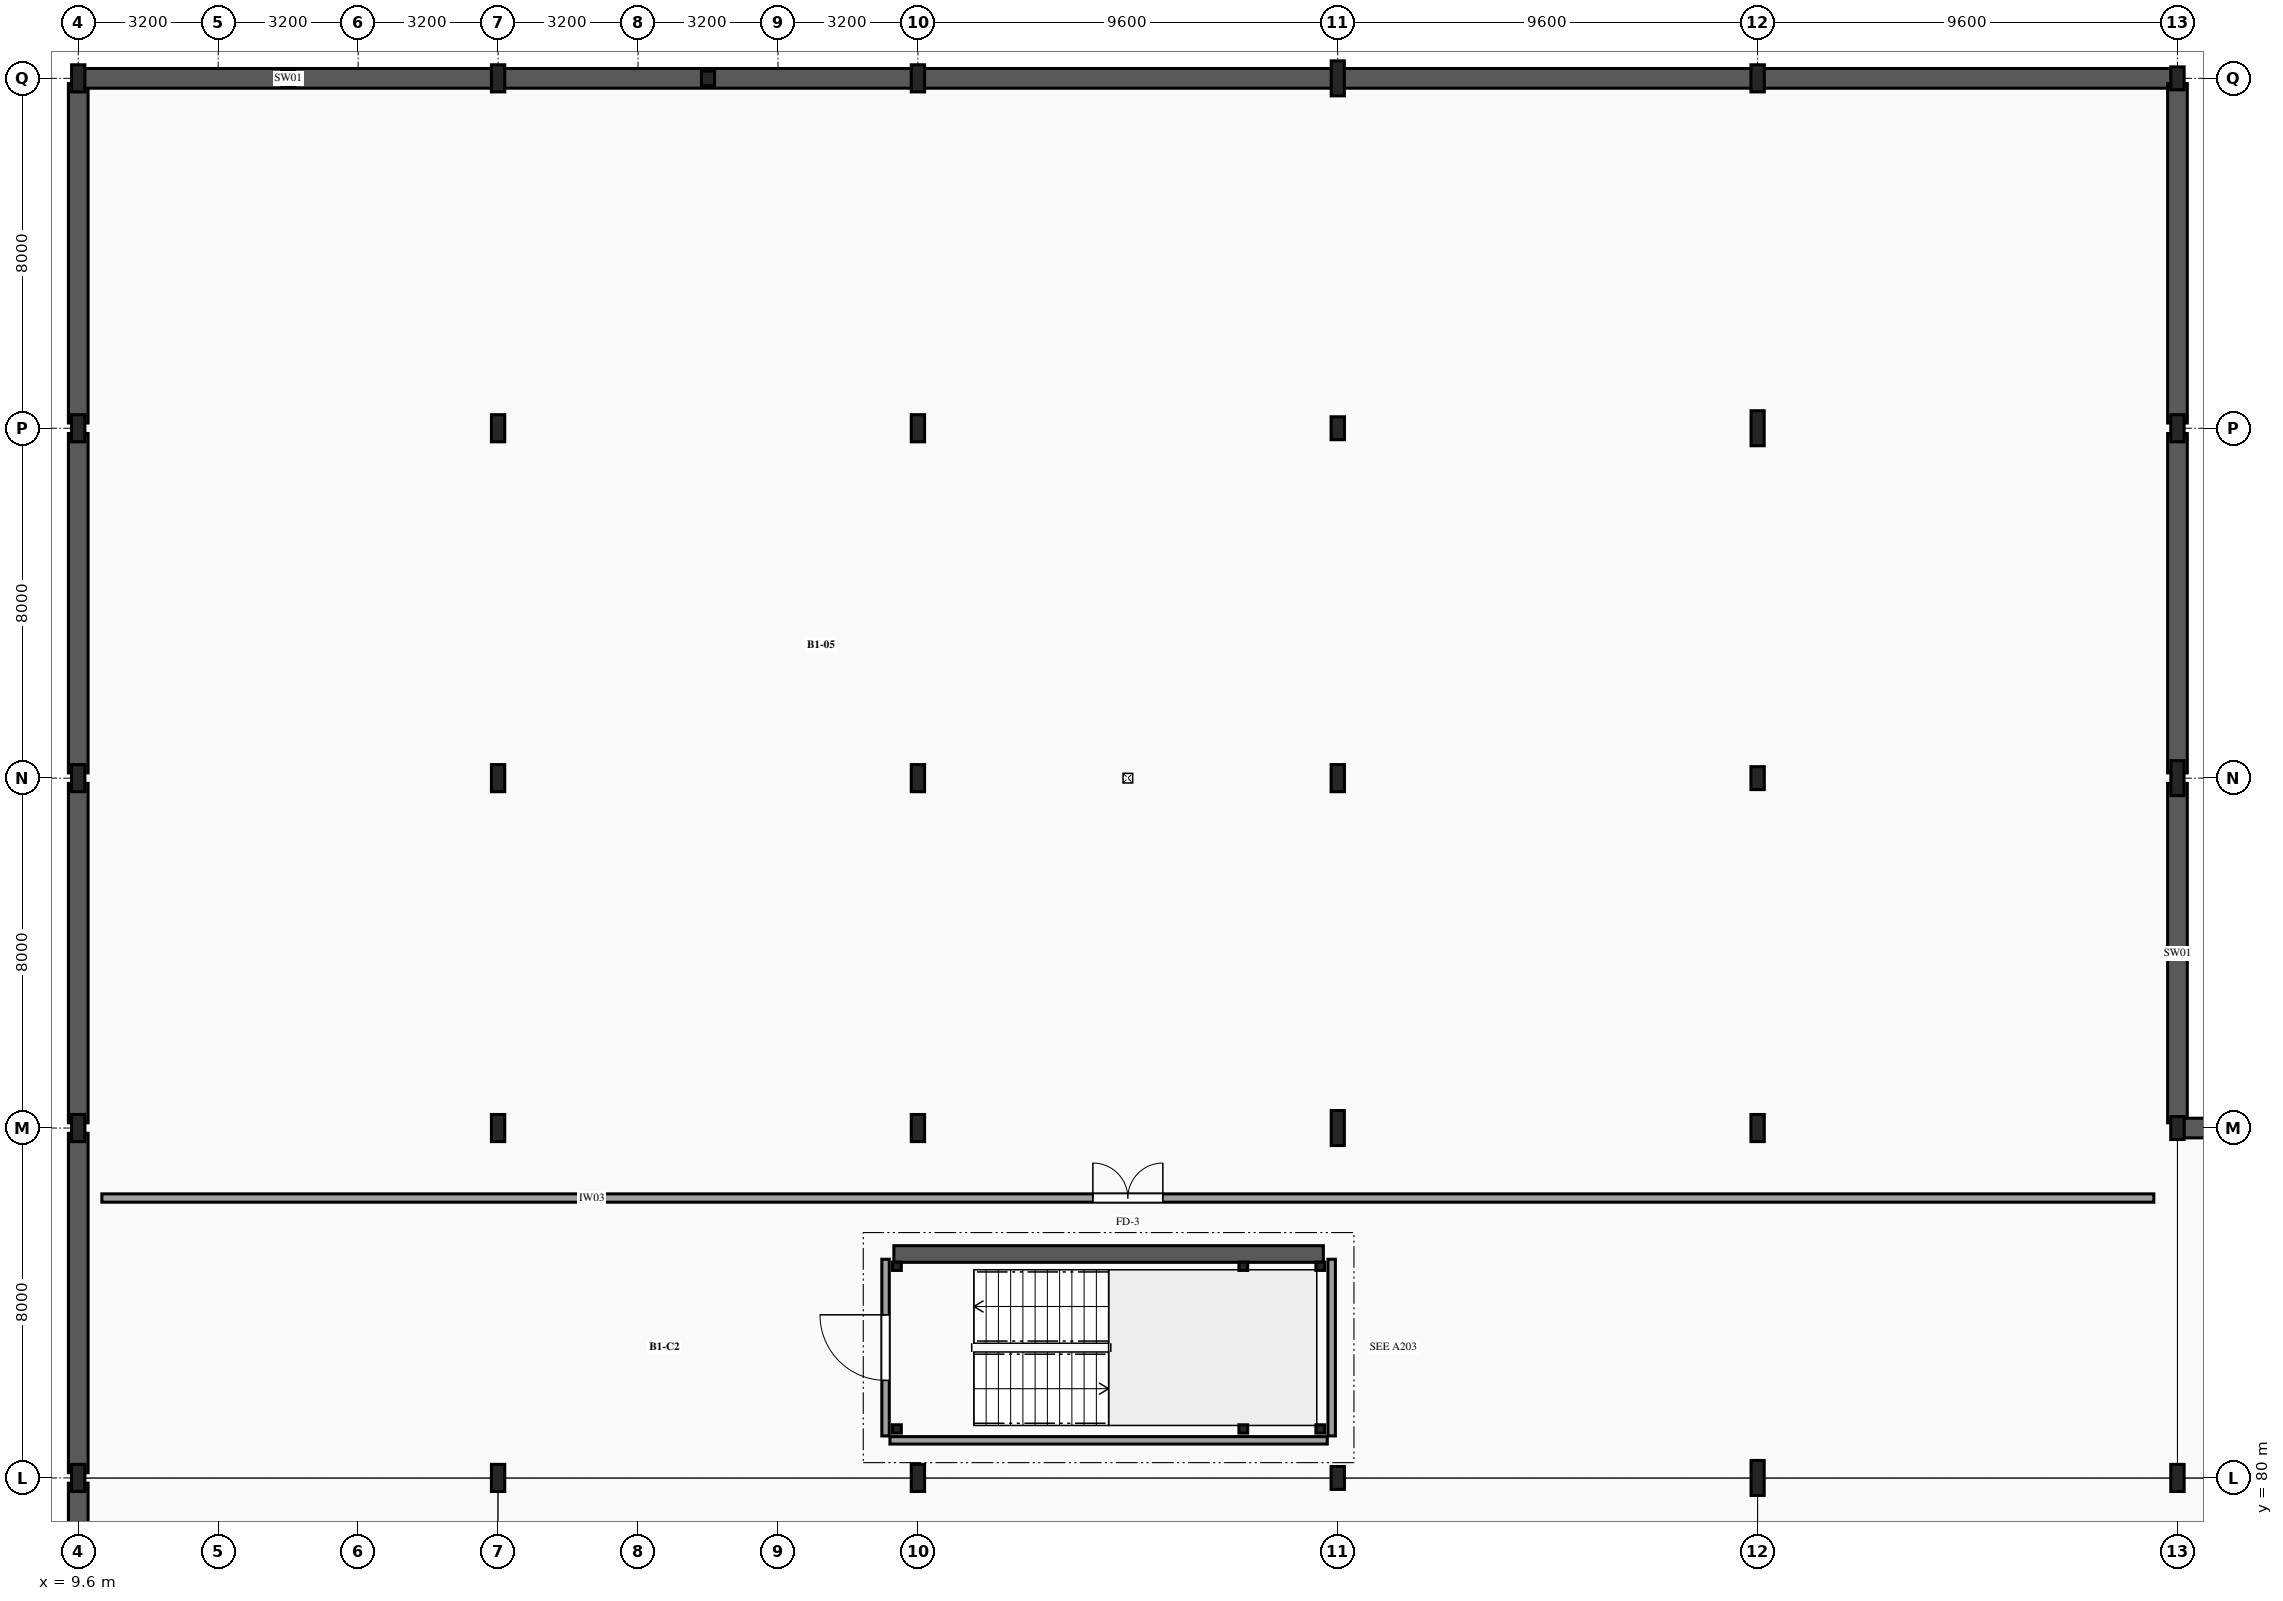
"""IFC4 building model, lengths in metres.
Left out: names, types, materials, properties, quantities, classifications, styles, units other than length and angle.
Written with IfcOpenShell. Run it as: python <this file> out.ifc"""

import sys

from ifc_helpers import new_model, si_unit, direction, frame, frame_2d, origin, origin_2d, place, context, subcontext, project, spatial, rectangle, i_section, extrude, element, fill, save


model = new_model("IFC4")
c1 = context("Model", 3, precision=1e-05, world=origin(), true_north=direction((0.0, 1.0)))
c2 = subcontext(c1, "Body", "Model", "MODEL_VIEW")
j1 = project(units=[si_unit("LENGTHUNIT", "METRE"), si_unit("PLANEANGLEUNIT", "RADIAN")], contexts=[c1])
p1 = place(None, origin())
s1 = spatial("IfcSite", under=j1, at=p1, CompositionType="ELEMENT")
p2 = place(p1, origin())
s2 = spatial("IfcBuilding", under=s1, at=p2, CompositionType="ELEMENT")
p3 = place(p2, frame((0.0, 0.0, -4.5)))
s3 = spatial("IfcBuildingStorey", under=s2, at=p3, CompositionType="ELEMENT", Elevation=-4.5)
for number, where, z_axis, x_axis in (
    (1, (9.6, 80.0, 0.0), (0.0, 0.0, 1.0), (1.0, 0.0, 0.0)),
    (2, (9.6, 88.0, 0.0), (0.0, 0.0, 1.0), (1.0, 0.0, 0.0)),
    (3, (9.6, 96.0, 0.0), (0.0, 0.0, 1.0), (1.0, 0.0, 0.0)),
    (4, (9.6, 104.0, 0.0), (0.0, 0.0, 1.0), (1.0, 0.0, 0.0)),
    (5, (9.6, 112.0, 0.0), (0.0, 0.0, 1.0), (1.0, 0.0, 0.0)),
    (6, (19.2, 80.0, 0.0), (0.0, 0.0, 1.0), (1.0, 0.0, 0.0)),
    (7, (19.2, 88.0, 0.0), (0.0, 0.0, 1.0), (1.0, 0.0, 0.0)),
    (8, (19.2, 96.0, 0.0), (0.0, 0.0, 1.0), (1.0, 0.0, 0.0)),
    (9, (19.2, 104.0, 0.0), (0.0, 0.0, 1.0), (1.0, 0.0, 0.0)),
    (10, (19.2, 112.0, 0.0), (0.0, 0.0, 1.0), (1.0, 0.0, 0.0)),
    (11, (28.8, 80.0, 0.0), (0.0, 0.0, 1.0), (1.0, 0.0, 0.0)),
    (12, (28.8, 88.0, 0.0), (0.0, 0.0, 1.0), (1.0, 0.0, 0.0)),
    (13, (28.8, 96.0, 0.0), (0.0, 0.0, 1.0), (1.0, 0.0, 0.0)),
    (14, (28.8, 104.0, 0.0), (0.0, 0.0, 1.0), (1.0, 0.0, 0.0)),
    (15, (28.8, 112.0, 0.0), (0.0, 0.0, 1.0), (1.0, 0.0, 0.0)),
):
    element("IfcColumn", number, at=place(p3, frame(where, z_axis=z_axis, x_axis=x_axis)), inside=s3, PredefinedType="COLUMN", context=c2, shape_type="SweptSolid", body=[
        extrude(i_section(OverallWidth=0.305, OverallDepth=0.62, WebThickness=0.021, FlangeThickness=0.04, FilletRadius=0.027, at=origin_2d()), origin(), (0.0, 0.0, 1.0), 4.22),
    ])
p4 = place(p3, frame((38.4, 80.0, 0.0), z_axis=(0.0, 0.0, 1.0), x_axis=(1.0, 0.0, 0.0)))
e16 = element("IfcColumn", 16, at=p4, inside=s3, PredefinedType="COLUMN", context=c2, shape_type="SweptSolid", body=[
    extrude(i_section(OverallWidth=0.306, OverallDepth=0.524, WebThickness=0.021, FlangeThickness=0.04, FilletRadius=0.027, at=origin_2d()), origin(), (0.0, 0.0, 1.0), 4.22),
])
p5 = place(p3, frame((38.4, 88.0, 0.0), z_axis=(0.0, 0.0, 1.0), x_axis=(1.0, 0.0, 0.0)))
e17 = element("IfcColumn", 17, at=p5, inside=s3, PredefinedType="COLUMN", context=c2, shape_type="SweptSolid", body=[
    extrude(i_section(OverallWidth=0.3, OverallDepth=0.8, WebThickness=0.018, FlangeThickness=0.033, FilletRadius=0.03, at=origin_2d()), origin(), (0.0, 0.0, 1.0), 4.22),
])
p6 = place(p3, frame((38.4, 96.0, 0.0), z_axis=(0.0, 0.0, 1.0), x_axis=(1.0, 0.0, 0.0)))
e18 = element("IfcColumn", 18, at=p6, inside=s3, PredefinedType="COLUMN", context=c2, shape_type="SweptSolid", body=[
    extrude(i_section(OverallWidth=0.305, OverallDepth=0.62, WebThickness=0.021, FlangeThickness=0.04, FilletRadius=0.027, at=origin_2d()), origin(), (0.0, 0.0, 1.0), 4.22),
])
p7 = place(p3, frame((38.4, 104.0, 0.0), z_axis=(0.0, 0.0, 1.0), x_axis=(1.0, 0.0, 0.0)))
e19 = element("IfcColumn", 19, at=p7, inside=s3, PredefinedType="COLUMN", context=c2, shape_type="SweptSolid", body=[
    extrude(i_section(OverallWidth=0.306, OverallDepth=0.524, WebThickness=0.021, FlangeThickness=0.04, FilletRadius=0.027, at=origin_2d()), origin(), (0.0, 0.0, 1.0), 4.22),
])
for number, where, z_axis, x_axis in (
    (20, (38.4, 112.0, 0.0), (0.0, 0.0, 1.0), (1.0, 0.0, 0.0)),
    (21, (48.0, 80.0, 0.0), (0.0, 0.0, 1.0), (1.0, 0.0, 0.0)),
):
    element("IfcColumn", number, at=place(p3, frame(where, z_axis=z_axis, x_axis=x_axis)), inside=s3, PredefinedType="COLUMN", context=c2, shape_type="SweptSolid", body=[
        extrude(i_section(OverallWidth=0.3, OverallDepth=0.8, WebThickness=0.018, FlangeThickness=0.033, FilletRadius=0.03, at=origin_2d()), origin(), (0.0, 0.0, 1.0), 4.22),
    ])
p8 = place(p3, frame((48.0, 88.0, 0.0), z_axis=(0.0, 0.0, 1.0), x_axis=(1.0, 0.0, 0.0)))
e22 = element("IfcColumn", 22, at=p8, inside=s3, PredefinedType="COLUMN", context=c2, shape_type="SweptSolid", body=[
    extrude(i_section(OverallWidth=0.305, OverallDepth=0.62, WebThickness=0.021, FlangeThickness=0.04, FilletRadius=0.027, at=origin_2d()), origin(), (0.0, 0.0, 1.0), 4.22),
])
p9 = place(p3, frame((48.0, 96.0, 0.0), z_axis=(0.0, 0.0, 1.0), x_axis=(1.0, 0.0, 0.0)))
e23 = element("IfcColumn", 23, at=p9, inside=s3, PredefinedType="COLUMN", context=c2, shape_type="SweptSolid", body=[
    extrude(i_section(OverallWidth=0.306, OverallDepth=0.524, WebThickness=0.021, FlangeThickness=0.04, FilletRadius=0.027, at=origin_2d()), origin(), (0.0, 0.0, 1.0), 4.22),
])
p10 = place(p3, frame((48.0, 104.0, 0.0), z_axis=(0.0, 0.0, 1.0), x_axis=(1.0, 0.0, 0.0)))
e24 = element("IfcColumn", 24, at=p10, inside=s3, PredefinedType="COLUMN", context=c2, shape_type="SweptSolid", body=[
    extrude(i_section(OverallWidth=0.3, OverallDepth=0.8, WebThickness=0.018, FlangeThickness=0.033, FilletRadius=0.03, at=origin_2d()), origin(), (0.0, 0.0, 1.0), 4.22),
])
for number, where, z_axis, x_axis in (
    (25, (48.0, 112.0, 0.0), (0.0, 0.0, 1.0), (1.0, 0.0, 0.0)),
    (26, (57.6, 80.0, 0.0), (0.0, 0.0, 1.0), (1.0, 0.0, 0.0)),
):
    element("IfcColumn", number, at=place(p3, frame(where, z_axis=z_axis, x_axis=x_axis)), inside=s3, PredefinedType="COLUMN", context=c2, shape_type="SweptSolid", body=[
        extrude(i_section(OverallWidth=0.305, OverallDepth=0.62, WebThickness=0.021, FlangeThickness=0.04, FilletRadius=0.027, at=origin_2d()), origin(), (0.0, 0.0, 1.0), 4.22),
    ])
p11 = place(p3, frame((57.6, 88.0, 0.0), z_axis=(0.0, 0.0, 1.0), x_axis=(1.0, 0.0, 0.0)))
e27 = element("IfcColumn", 27, at=p11, inside=s3, PredefinedType="COLUMN", context=c2, shape_type="SweptSolid", body=[
    extrude(i_section(OverallWidth=0.306, OverallDepth=0.524, WebThickness=0.021, FlangeThickness=0.04, FilletRadius=0.027, at=origin_2d()), origin(), (0.0, 0.0, 1.0), 4.22),
])
p12 = place(p3, frame((57.6, 96.0, 0.0), z_axis=(0.0, 0.0, 1.0), x_axis=(1.0, 0.0, 0.0)))
e28 = element("IfcColumn", 28, at=p12, inside=s3, PredefinedType="COLUMN", context=c2, shape_type="SweptSolid", body=[
    extrude(i_section(OverallWidth=0.3, OverallDepth=0.8, WebThickness=0.018, FlangeThickness=0.033, FilletRadius=0.03, at=origin_2d()), origin(), (0.0, 0.0, 1.0), 4.22),
])
p13 = place(p3, frame((57.6, 104.0, 0.0), z_axis=(0.0, 0.0, 1.0), x_axis=(1.0, 0.0, 0.0)))
e29 = element("IfcColumn", 29, at=p13, inside=s3, PredefinedType="COLUMN", context=c2, shape_type="SweptSolid", body=[
    extrude(i_section(OverallWidth=0.305, OverallDepth=0.62, WebThickness=0.021, FlangeThickness=0.04, FilletRadius=0.027, at=origin_2d()), origin(), (0.0, 0.0, 1.0), 4.22),
])
p14 = place(p3, frame((57.6, 112.0, 0.0), z_axis=(0.0, 0.0, 1.0), x_axis=(1.0, 0.0, 0.0)))
e30 = element("IfcColumn", 30, at=p14, inside=s3, PredefinedType="COLUMN", context=c2, shape_type="SweptSolid", body=[
    extrude(i_section(OverallWidth=0.306, OverallDepth=0.524, WebThickness=0.021, FlangeThickness=0.04, FilletRadius=0.027, at=origin_2d()), origin(), (0.0, 0.0, 1.0), 4.22),
])
for number, where, z_axis, x_axis in (
    (31, (14.4, 112.0, 0.0), (0.0, 0.0, 1.0), (1.0, 0.0, 0.0)),
    (32, (24.0, 112.0, 0.0), (0.0, 0.0, 1.0), (1.0, 0.0, 0.0)),
):
    element("IfcColumn", number, at=place(p3, frame(where, z_axis=z_axis, x_axis=x_axis)), inside=s3, PredefinedType="PILASTER", context=c2, shape_type="SweptSolid", body=[
        extrude(i_section(OverallWidth=0.3, OverallDepth=0.33, WebThickness=0.01, FlangeThickness=0.017, FilletRadius=0.027, at=origin_2d()), origin(), (0.0, 0.0, 1.0), 4.22),
    ])
for number, where, z_axis, x_axis in (
    (33, (9.6, 72.12, 0.0), (0.0, 0.0, 1.0), (0.0, 1.0, 0.0)),
    (34, (9.6, 80.12, 0.0), (0.0, 0.0, 1.0), (0.0, 1.0, 0.0)),
    (35, (9.6, 88.12, 0.0), (0.0, 0.0, 1.0), (0.0, 1.0, 0.0)),
    (36, (9.6, 96.12, 0.0), (0.0, 0.0, 1.0), (0.0, 1.0, 0.0)),
    (37, (9.6, 104.12, 0.0), (0.0, 0.0, 1.0), (0.0, 1.0, 0.0)),
):
    element("IfcWall", number, at=place(p3, frame(where, z_axis=z_axis, x_axis=x_axis)), inside=s3, PredefinedType="SHEAR", context=c2, shape_type="SweptSolid", body=[
        extrude(rectangle(XDim=7.76, YDim=0.45, at=frame_2d((3.88, 0.0))), origin(), (0.0, 0.0, 1.0), 4.22),
    ])
p15 = place(p3, frame((9.72, 112.0, 0.0), z_axis=(0.0, 0.0, 1.0), x_axis=(1.0, 0.0, 0.0)))
e38 = element("IfcWall", 38, at=p15, inside=s3, PredefinedType="SHEAR", context=c2, shape_type="SweptSolid", body=[
    extrude(rectangle(XDim=9.36, YDim=0.45, at=frame_2d((4.68, 0.0))), origin(), (0.0, 0.0, 1.0), 4.22),
])
p16 = place(p3, frame((19.32, 112.0, 0.0), z_axis=(0.0, 0.0, 1.0), x_axis=(1.0, 0.0, 0.0)))
e39 = element("IfcWall", 39, at=p16, inside=s3, PredefinedType="SHEAR", context=c2, shape_type="SweptSolid", body=[
    extrude(rectangle(XDim=9.36, YDim=0.45, at=frame_2d((4.68, 0.0))), origin(), (0.0, 0.0, 1.0), 4.22),
])
p17 = place(p3, frame((28.92, 112.0, 0.0), z_axis=(0.0, 0.0, 1.0), x_axis=(1.0, 0.0, 0.0)))
e40 = element("IfcWall", 40, at=p17, inside=s3, PredefinedType="SHEAR", context=c2, shape_type="SweptSolid", body=[
    extrude(rectangle(XDim=9.36, YDim=0.45, at=frame_2d((4.68, 0.0))), origin(), (0.0, 0.0, 1.0), 4.22),
])
for number, where, z_axis, x_axis in (
    (41, (38.52, 112.0, 0.0), (0.0, 0.0, 1.0), (1.0, 0.0, 0.0)),
    (42, (48.12, 112.0, 0.0), (0.0, 0.0, 1.0), (1.0, 0.0, 0.0)),
):
    element("IfcWall", number, at=place(p3, frame(where, z_axis=z_axis, x_axis=x_axis)), inside=s3, PredefinedType="SHEAR", context=c2, shape_type="SweptSolid", body=[
        extrude(rectangle(XDim=9.36, YDim=0.45, at=frame_2d((4.68, 0.0))), origin(), (0.0, 0.0, 1.0), 4.22),
    ])
for number, where, z_axis, x_axis in (
    (43, (57.6, 88.12, 0.0), (0.0, 0.0, 1.0), (0.0, 1.0, 0.0)),
    (44, (57.6, 96.12, 0.0), (0.0, 0.0, 1.0), (0.0, 1.0, 0.0)),
    (45, (57.6, 104.12, 0.0), (0.0, 0.0, 1.0), (0.0, 1.0, 0.0)),
):
    element("IfcWall", number, at=place(p3, frame(where, z_axis=z_axis, x_axis=x_axis)), inside=s3, PredefinedType="SHEAR", context=c2, shape_type="SweptSolid", body=[
        extrude(rectangle(XDim=7.76, YDim=0.45, at=frame_2d((3.88, 0.0))), origin(), (0.0, 0.0, 1.0), 4.22),
    ])
p18 = place(p3, frame((57.72, 88.0, 0.0), z_axis=(0.0, 0.0, 1.0), x_axis=(1.0, 0.0, 0.0)))
e46 = element("IfcWall", 46, at=p18, inside=s3, PredefinedType="SHEAR", context=c2, shape_type="SweptSolid", body=[
    extrude(rectangle(XDim=9.36, YDim=0.45, at=frame_2d((4.68, 0.0))), origin(), (0.0, 0.0, 1.0), 4.22),
])
p19 = place(p3, frame((28.25, 85.12, 0.0), z_axis=(0.0, 0.0, 1.0), x_axis=(1.0, 0.0, 0.0)))
e47 = element("IfcWall", 47, at=p19, inside=s3, PredefinedType="SHEAR", context=c2, shape_type="SweptSolid", body=[
    extrude(rectangle(XDim=9.82, YDim=0.38, at=frame_2d((4.91, 0.0))), origin(), (0.0, 0.0, 1.0), 4.22),
])
for number, where, z_axis, x_axis in (
    (48, (28.32, 81.12, 0.0), (0.0, 0.0, 1.0), (1.0, 0.0, 0.0)),
    (49, (38.0, 81.12, 0.0), (0.0, 0.0, 1.0), (1.0, 0.0, 0.0)),
    (50, (38.0, 84.84, 0.0), (0.0, 0.0, 1.0), (1.0, 0.0, 0.0)),
    (51, (28.32, 84.84, 0.0), (0.0, 0.0, 1.0), (1.0, 0.0, 0.0)),
    (52, (36.24, 81.12, 0.0), (0.0, 0.0, 1.0), (1.0, 0.0, 0.0)),
    (53, (36.24, 84.84, 0.0), (0.0, 0.0, 1.0), (1.0, 0.0, 0.0)),
):
    element("IfcColumn", number, at=place(p3, frame(where, z_axis=z_axis, x_axis=x_axis)), inside=s3, PredefinedType="COLUMN", context=c2, shape_type="SweptSolid", body=[
        extrude(i_section(OverallWidth=0.2, OverallDepth=0.19, WebThickness=0.007, FlangeThickness=0.01, FilletRadius=0.018, at=origin_2d()), origin(), (0.0, 0.0, 1.0), 4.5),
    ])
p20 = place(p3, frame((28.06, 80.96, 0.0), z_axis=(0.0, 0.0, 1.0), x_axis=(0.0, 1.0, 0.0)))
e54 = element("IfcWall", 54, at=p20, inside=s3, PredefinedType="SOLIDWALL", context=c2, shape_type="SweptSolid", body=[
    extrude(rectangle(XDim=4.04, YDim=0.17, at=frame_2d((2.02, 0.0))), origin(), (0.0, 0.0, 1.0), 3.58),
])
p21 = place(p20, frame((1.27, 0.0, 0.0)))
e55 = element("IfcOpeningElement", 55, at=p21, cuts=e54, PredefinedType="OPENING", context=c2, shape_type="SweptSolid", body=[
    extrude(rectangle(XDim=1.5, YDim=2.2, at=frame_2d((0.75, 1.1))), frame((0.0, 0.095, 0.0), z_axis=(0.0, -1.0, 0.0), x_axis=(1.0, 0.0, 0.0)), (0.0, 0.0, 1.0), 0.19),
])
p22 = place(p3, frame((38.26, 80.96, 0.0), z_axis=(0.0, 0.0, 1.0), x_axis=(0.0, 1.0, 0.0)))
e56 = element("IfcWall", 56, at=p22, inside=s3, PredefinedType="SOLIDWALL", context=c2, shape_type="SweptSolid", body=[
    extrude(rectangle(XDim=4.04, YDim=0.17, at=frame_2d((2.02, 0.0))), origin(), (0.0, 0.0, 1.0), 3.58),
])
p23 = place(p3, frame((28.16, 80.86, 0.0), z_axis=(0.0, 0.0, 1.0), x_axis=(1.0, 0.0, 0.0)))
e57 = element("IfcWall", 57, at=p23, inside=s3, PredefinedType="SOLIDWALL", context=c2, shape_type="SweptSolid", body=[
    extrude(rectangle(XDim=10.0, YDim=0.17, at=frame_2d((5.0, 0.0))), origin(), (0.0, 0.0, 1.0), 3.58),
])
p24 = place(p3, frame((10.14, 86.4, 0.0), z_axis=(0.0, 0.0, 1.0), x_axis=(1.0, 0.0, 0.0)))
e58 = element("IfcWall", 58, at=p24, inside=s3, PredefinedType="SOLIDWALL", context=c2, shape_type="SweptSolid", body=[
    extrude(rectangle(XDim=46.92, YDim=0.19, at=frame_2d((23.46, 0.0))), origin(), (0.0, 0.0, 1.0), 3.58),
])
p25 = place(p24, frame((22.66, 0.0, 0.0)))
e59 = element("IfcOpeningElement", 59, at=p25, cuts=e58, PredefinedType="OPENING", context=c2, shape_type="SweptSolid", body=[
    extrude(rectangle(XDim=1.6, YDim=2.25, at=frame_2d((0.8, 1.125))), frame((0.0, 0.105, 0.0), z_axis=(0.0, -1.0, 0.0), x_axis=(1.0, 0.0, 0.0)), (0.0, 0.0, 1.0), 0.21),
])
p26 = place(p21, origin())
e60 = element("IfcDoor", 60, at=p26, inside=s3, OperationType="SINGLE_SWING_RIGHT", PredefinedType="DOOR", context=c2, shape_type="SweptSolid", body=[
    extrude(rectangle(XDim=1.5, YDim=2.2, at=frame_2d((0.75, 1.1))), frame((0.0, 0.025, 0.0), z_axis=(0.0, -1.0, 0.0), x_axis=(1.0, 0.0, 0.0)), (0.0, 0.0, 1.0), 0.05),
])
fill(e55, e60)
p27 = place(p25, origin())
e61 = element("IfcDoor", 61, at=p27, inside=s3, OperationType="DOUBLE_DOOR_SINGLE_SWING", PredefinedType="DOOR", context=c2, shape_type="SweptSolid", body=[
    extrude(rectangle(XDim=1.6, YDim=2.25, at=frame_2d((0.8, 1.125))), frame((0.0, 0.025, 0.0), z_axis=(0.0, -1.0, 0.0), x_axis=(1.0, 0.0, 0.0)), (0.0, 0.0, 1.0), 0.05),
])
fill(e59, e61)
save(model, sys.argv[1])
